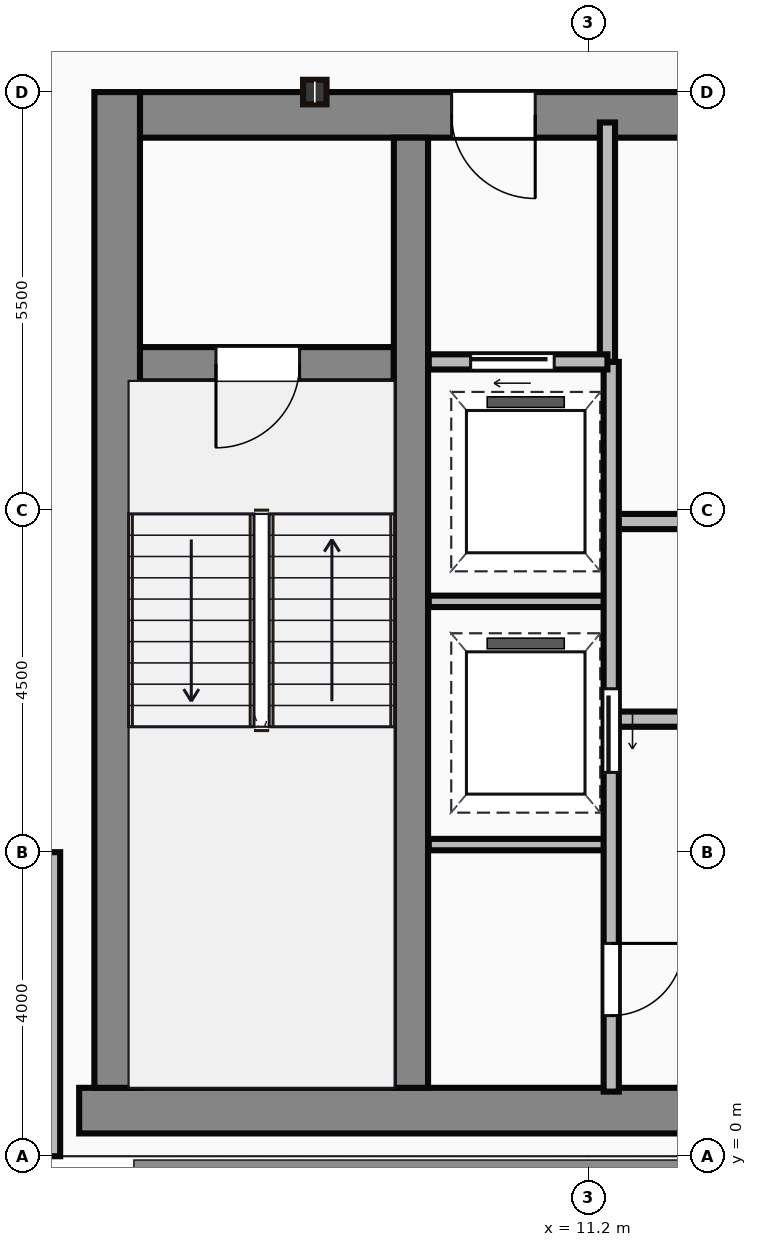
"""IFC4 building model, lengths in metres.
Left out: names, types, materials, properties, quantities, classifications, styles, units other than length and angle.
Written with IfcOpenShell. Run it as: python <this file> out.ifc"""

import sys

from ifc_helpers import new_model, si_unit, direction, frame, frame_2d, origin, origin_2d, place, context, subcontext, project, spatial, rectangle, i_section, extrude, source, transform, mapped, element, fill, save


model = new_model("IFC4")
c1 = context("Model", 3, precision=1e-05, world=origin(), true_north=direction((0.0, 1.0)))
c2 = subcontext(c1, "Body", "Model", "MODEL_VIEW")
j1 = project(units=[si_unit("LENGTHUNIT", "METRE"), si_unit("PLANEANGLEUNIT", "RADIAN")], contexts=[c1])
p1 = place(None, origin())
s1 = spatial("IfcSite", under=j1, at=p1, CompositionType="ELEMENT")
p2 = place(p1, origin())
s2 = spatial("IfcBuilding", under=s1, at=p2, CompositionType="ELEMENT")
p3 = place(p2, frame((0.0, 0.0, 307.45)))
s3 = spatial("IfcBuildingStorey", under=s2, at=p3, CompositionType="ELEMENT", Elevation=307.45)
m1 = source(origin(), c2, "Body", "SweptSolid", [
    extrude(rectangle(XDim=29.5, YDim=0.6, at=frame_2d((14.75, 0.0))), origin(), (0.0, 0.0, 1.0), 3.8),
])
p4 = place(p3, frame((4.5, 0.6, 0.0), z_axis=(0.0, 0.0, 1.0), x_axis=(1.0, 0.0, 0.0)))
e1 = element("IfcWall", 1, at=p4, inside=s3, PredefinedType="SHEAR", context=c2, shape_type="MappedRepresentation", body=[
    mapped(m1, transform((0.0, 0.0, 0.0))),
])
m2 = source(origin(), c2, "Body", "SweptSolid", [
    extrude(rectangle(XDim=13.1, YDim=0.6, at=frame_2d((6.55, 0.0))), origin(), (0.0, 0.0, 1.0), 3.8),
])
p5 = place(p3, frame((5.0, 0.9, 0.0), z_axis=(0.0, 0.0, 1.0), x_axis=(0.0, 1.0, 0.0)))
e2 = element("IfcWall", 2, at=p5, inside=s3, PredefinedType="SHEAR", context=c2, shape_type="MappedRepresentation", body=[
    mapped(m2, transform((0.0, 0.0, 0.0))),
])
m3 = source(origin(), c2, "Body", "SweptSolid", [
    extrude(rectangle(XDim=9.1, YDim=0.6, at=frame_2d((4.55, 0.0))), origin(), (0.0, 0.0, 1.0), 3.8),
])
p6 = place(p3, frame((5.3, 13.7, 0.0), z_axis=(0.0, 0.0, 1.0), x_axis=(1.0, 0.0, 0.0)))
e3 = element("IfcWall", 3, at=p6, inside=s3, PredefinedType="SHEAR", context=c2, shape_type="MappedRepresentation", body=[
    mapped(m3, transform((0.0, 0.0, 0.0))),
])
p7 = place(p6, frame((4.1, 0.0, 0.0)))
e4 = element("IfcOpeningElement", 4, at=p7, cuts=e3, PredefinedType="OPENING", context=c2, shape_type="SweptSolid", body=[
    extrude(rectangle(XDim=1.1, YDim=2.15, at=frame_2d((0.55, 1.075))), frame((0.0, 0.31, 0.0), z_axis=(0.0, -1.0, 0.0), x_axis=(1.0, 0.0, 0.0)), (0.0, 0.0, 1.0), 0.62),
])
m4 = source(origin(), c2, "Body", "SweptSolid", [
    extrude(rectangle(XDim=12.5, YDim=0.45, at=frame_2d((6.25, 0.0))), origin(), (0.0, 0.0, 1.0), 3.8),
])
p8 = place(p3, frame((8.865, 0.9, 0.0), z_axis=(0.0, 0.0, 1.0), x_axis=(0.0, 1.0, 0.0)))
e5 = element("IfcWall", 5, at=p8, inside=s3, PredefinedType="SHEAR", context=c2, shape_type="MappedRepresentation", body=[
    mapped(m4, transform((0.0, 0.0, 0.0))),
])
m5 = source(origin(), c2, "Body", "SweptSolid", [
    extrude(rectangle(XDim=3.39, YDim=0.45, at=frame_2d((1.695, 0.0))), origin(), (0.0, 0.0, 1.0), 3.8),
])
p9 = place(p3, frame((5.25, 10.42, 0.0), z_axis=(0.0, 0.0, 1.0), x_axis=(1.0, 0.0, 0.0)))
e6 = element("IfcWall", 6, at=p9, inside=s3, PredefinedType="SHEAR", context=c2, shape_type="MappedRepresentation", body=[
    mapped(m5, transform((0.0, 0.0, 0.0))),
])
p10 = place(p9, frame((1.05, 0.0, 0.0)))
e7 = element("IfcOpeningElement", 7, at=p10, cuts=e6, PredefinedType="OPENING", context=c2, shape_type="SweptSolid", body=[
    extrude(rectangle(XDim=1.1, YDim=2.15, at=frame_2d((0.55, 1.075))), frame((0.0, 0.235, 0.0), z_axis=(0.0, -1.0, 0.0), x_axis=(1.0, 0.0, 0.0)), (0.0, 0.0, 1.0), 0.47),
])
m6 = source(origin(), c2, "Body", "SweptSolid", [
    extrude(i_section(OverallWidth=0.309, OverallDepth=0.323, WebThickness=0.014, FlangeThickness=0.023, at=origin_2d()), origin(), (0.0, 0.0, 1.0), 3.8),
])
p11 = place(p3, frame((7.6, 14.0, 0.0), z_axis=(0.0, 0.0, 1.0), x_axis=(1.0, 0.0, 0.0)))
e8 = element("IfcColumn", 8, at=p11, inside=s3, PredefinedType="COLUMN", context=c2, shape_type="MappedRepresentation", body=[
    mapped(m6, transform((0.0, 0.0, 0.0))),
])
m7 = source(origin(), c2, "Body", "SweptSolid", [
    extrude(rectangle(XDim=4.0, YDim=0.25, at=frame_2d((2.0, 0.0))), origin(), (0.0, 0.0, 1.0), 3.5),
])
p12 = place(p3, frame((4.125, 4.0, 0.0), z_axis=(0.0, 0.0, 1.0), x_axis=(0.0, -1.0, 0.0)))
e9 = element("IfcWall", 9, at=p12, inside=s3, PredefinedType="STANDARD", context=c2, shape_type="MappedRepresentation", body=[
    mapped(m7, transform((0.0, 0.0, 0.0))),
])
m8 = source(origin(), c2, "Body", "SweptSolid", [
    extrude(rectangle(XDim=3.18, YDim=0.2, at=frame_2d((1.59, 0.0))), origin(), (0.0, 0.0, 1.0), 3.5),
])
p13 = place(p3, frame((11.45, 10.42, 0.0), z_axis=(0.0, 0.0, 1.0), x_axis=(0.0, 1.0, 0.0)))
e10 = element("IfcWall", 10, at=p13, inside=s3, PredefinedType="PARTITIONING", context=c2, shape_type="MappedRepresentation", body=[
    mapped(m8, transform((0.0, 0.0, 0.0))),
])
m9 = source(origin(), c2, "Body", "SweptSolid", [
    extrude(rectangle(XDim=2.35, YDim=0.2, at=frame_2d((1.175, 0.0))), origin(), (0.0, 0.0, 1.0), 3.5),
])
p14 = place(p3, frame((9.1, 10.45, 0.0), z_axis=(0.0, 0.0, 1.0), x_axis=(1.0, 0.0, 0.0)))
e11 = element("IfcWall", 11, at=p14, inside=s3, PredefinedType="PARTITIONING", context=c2, shape_type="MappedRepresentation", body=[
    mapped(m9, transform((0.0, 0.0, 0.0))),
])
p15 = place(p14, frame((0.55, 0.0, 0.0)))
e12 = element("IfcOpeningElement", 12, at=p15, cuts=e11, PredefinedType="OPENING", context=c2, shape_type="SweptSolid", body=[
    extrude(rectangle(XDim=1.1, YDim=2.15, at=frame_2d((0.55, 1.075))), frame((0.0, 0.11, 0.0), z_axis=(0.0, -1.0, 0.0), x_axis=(1.0, 0.0, 0.0)), (0.0, 0.0, 1.0), 0.22),
])
m10 = source(origin(), c2, "Body", "SweptSolid", [
    extrude(rectangle(XDim=9.6, YDim=0.2, at=frame_2d((4.8, 0.0))), origin(), (0.0, 0.0, 1.0), 3.5),
])
p16 = place(p3, frame((11.5, 0.85, 0.0), z_axis=(0.0, 0.0, 1.0), x_axis=(0.0, 1.0, 0.0)))
e13 = element("IfcWall", 13, at=p16, inside=s3, PredefinedType="PARTITIONING", context=c2, shape_type="MappedRepresentation", body=[
    mapped(m10, transform((0.0, 0.0, 0.0))),
])
p17 = place(p16, frame((4.2, 0.0, 0.0)))
e14 = element("IfcOpeningElement", 14, at=p17, cuts=e13, PredefinedType="OPENING", context=c2, shape_type="SweptSolid", body=[
    extrude(rectangle(XDim=1.1, YDim=2.15, at=frame_2d((0.55, 1.075))), frame((0.0, 0.11, 0.0), z_axis=(0.0, -1.0, 0.0), x_axis=(1.0, 0.0, 0.0)), (0.0, 0.0, 1.0), 0.22),
])
p18 = place(p16, frame((1.0, 0.0, 0.0)))
e15 = element("IfcOpeningElement", 15, at=p18, cuts=e13, PredefinedType="OPENING", context=c2, shape_type="SweptSolid", body=[
    extrude(rectangle(XDim=0.95, YDim=2.15, at=frame_2d((0.475, 1.075))), frame((0.0, 0.11, 0.0), z_axis=(0.0, -1.0, 0.0), x_axis=(1.0, 0.0, 0.0)), (0.0, 0.0, 1.0), 0.22),
])
m11 = source(origin(), c2, "Body", "SweptSolid", [
    extrude(rectangle(XDim=2.4, YDim=0.15, at=frame_2d((1.2, 0.0))), origin(), (0.0, 0.0, 1.0), 3.5),
])
for number, where, z_axis, x_axis in (
    (16, (9.1, 4.1, 0.0), (0.0, 0.0, 1.0), (1.0, 0.0, 0.0)),
    (17, (9.1, 7.3, 0.0), (0.0, 0.0, 1.0), (1.0, 0.0, 0.0)),
):
    element("IfcWall", number, at=place(p3, frame(where, z_axis=z_axis, x_axis=x_axis)), inside=s3, PredefinedType="PARTITIONING", context=c2, shape_type="MappedRepresentation", body=[
        mapped(m11, transform((0.0, 0.0, 0.0))),
    ])
m12 = source(origin(), c2, "Body", "SweptSolid", [
    extrude(rectangle(XDim=11.85, YDim=0.2, at=frame_2d((5.925, 0.0))), origin(), (0.0, 0.0, 1.0), 3.5),
])
p19 = place(p3, frame((11.55, 5.75, 0.0), z_axis=(0.0, 0.0, 1.0), x_axis=(1.0, 0.0, 0.0)))
e18 = element("IfcWall", 18, at=p19, inside=s3, PredefinedType="PARTITIONING", context=c2, shape_type="MappedRepresentation", body=[
    mapped(m12, transform((0.0, 0.0, 0.0))),
])
p20 = place(p19, frame((5.2, 0.0, 0.0)))
e19 = element("IfcOpeningElement", 19, at=p20, cuts=e18, PredefinedType="OPENING", context=c2, shape_type="SweptSolid", body=[
    extrude(rectangle(XDim=1.1, YDim=2.15, at=frame_2d((0.55, 1.075))), frame((0.0, 0.11, 0.0), z_axis=(0.0, -1.0, 0.0), x_axis=(1.0, 0.0, 0.0)), (0.0, 0.0, 1.0), 0.22),
])
p21 = place(p3, frame((11.55, 8.35, 0.0), z_axis=(0.0, 0.0, 1.0), x_axis=(1.0, 0.0, 0.0)))
e20 = element("IfcWall", 20, at=p21, inside=s3, PredefinedType="PARTITIONING", context=c2, shape_type="MappedRepresentation", body=[
    mapped(m12, transform((0.0, 0.0, 0.0))),
])
m13 = source(origin(), c2, "Body", "SweptSolid", [
    extrude(rectangle(XDim=1.1, YDim=2.15, at=frame_2d((0.55, 1.075))), frame((0.0, 0.025, 0.0), z_axis=(0.0, -1.0, 0.0), x_axis=(1.0, 0.0, 0.0)), (0.0, 0.0, 1.0), 0.05),
])
p22 = place(p10, frame((1.1, 0.0, 0.0), z_axis=(0.0, 0.0, 1.0), x_axis=(-1.0, 0.0, 0.0)))
e21 = element("IfcDoor", 21, at=p22, inside=s3, OperationType="SINGLE_SWING_LEFT", PredefinedType="DOOR", context=c2, shape_type="MappedRepresentation", body=[
    mapped(m13, transform((0.0, 0.0, 0.0))),
])
fill(e7, e21)
p23 = place(p7, origin())
e22 = element("IfcDoor", 22, at=p23, inside=s3, OperationType="SINGLE_SWING_RIGHT", PredefinedType="DOOR", context=c2, shape_type="MappedRepresentation", body=[
    mapped(m13, transform((0.0, 0.0, 0.0))),
])
fill(e4, e22)
p24 = place(p15, origin())
e23 = element("IfcDoor", 23, at=p24, inside=s3, OperationType="SLIDING_TO_LEFT", PredefinedType="DOOR", context=c2, shape_type="MappedRepresentation", body=[
    mapped(m13, transform((0.0, 0.0, 0.0))),
])
fill(e12, e23)
p25 = place(p17, frame((1.1, 0.0, 0.0), z_axis=(0.0, 0.0, 1.0), x_axis=(-1.0, 0.0, 0.0)))
e24 = element("IfcDoor", 24, at=p25, inside=s3, OperationType="SLIDING_TO_LEFT", PredefinedType="DOOR", context=c2, shape_type="MappedRepresentation", body=[
    mapped(m13, transform((0.0, 0.0, 0.0))),
])
fill(e14, e24)
m14 = source(origin(), c2, "Body", "SweptSolid", [
    extrude(rectangle(XDim=0.95, YDim=2.15, at=frame_2d((0.475, 1.075))), frame((0.0, 0.025, 0.0), z_axis=(0.0, -1.0, 0.0), x_axis=(1.0, 0.0, 0.0)), (0.0, 0.0, 1.0), 0.05),
])
p26 = place(p18, frame((0.95, 0.0, 0.0), z_axis=(0.0, 0.0, 1.0), x_axis=(-1.0, 0.0, 0.0)))
e25 = element("IfcDoor", 25, at=p26, inside=s3, OperationType="SINGLE_SWING_RIGHT", PredefinedType="DOOR", context=c2, shape_type="MappedRepresentation", body=[
    mapped(m14, transform((0.0, 0.0, 0.0))),
])
fill(e15, e25)
save(model, sys.argv[1])
